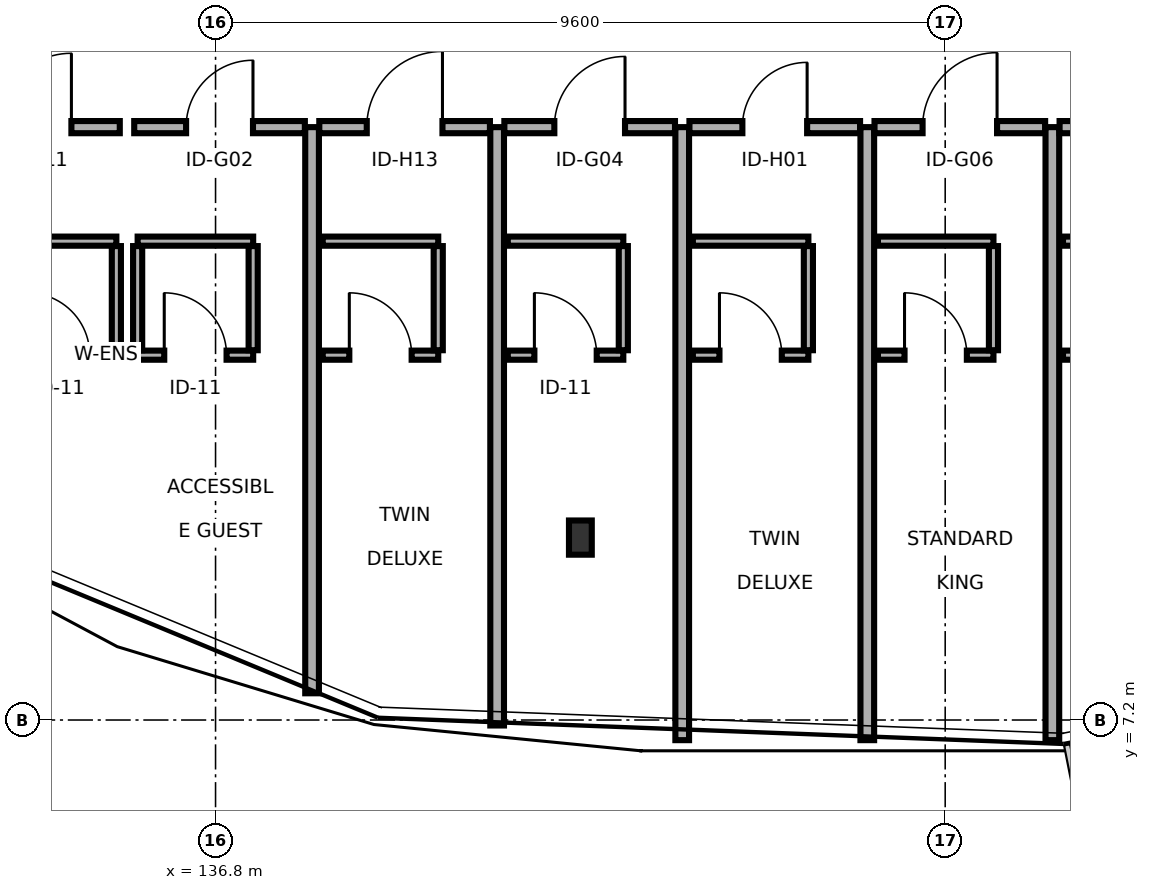
"""IFC4 building model, lengths in metres.
Left out: names, types, materials, properties, quantities, classifications, styles, units other than length and angle.
Written with IfcOpenShell. Run it as: python <this file> out.ifc"""

import sys

from ifc_helpers import new_model, si_unit, direction, frame, frame_2d, origin, origin_2d, place, context, subcontext, project, spatial, rectangle, i_section, extrude, element, fill, save


model = new_model("IFC4")
c1 = context("Model", 3, precision=1e-05, world=origin(), true_north=direction((0.0, 1.0)))
c2 = subcontext(c1, "Body", "Model", "MODEL_VIEW")
j1 = project(units=[si_unit("LENGTHUNIT", "METRE"), si_unit("PLANEANGLEUNIT", "RADIAN")], contexts=[c1])
p1 = place(None, origin())
s1 = spatial("IfcSite", under=j1, at=p1, CompositionType="ELEMENT")
p2 = place(p1, origin())
s2 = spatial("IfcBuilding", under=s1, at=p2, CompositionType="ELEMENT")
p3 = place(p2, frame((0.0, 0.0, 31.7)))
s3 = spatial("IfcBuildingStorey", under=s2, at=p3, CompositionType="ELEMENT", Elevation=31.7)
p4 = place(p3, frame((141.6, 9.6, 0.0), z_axis=(0.0, 0.0, 1.0), x_axis=(1.0, 0.0, 0.0)))
e1 = element("IfcColumn", 1, at=p4, inside=s3, PredefinedType="COLUMN", context=c2, shape_type="SweptSolid", body=[
    extrude(i_section(OverallWidth=0.3, OverallDepth=0.45, WebThickness=0.014, FlangeThickness=0.026, FilletRadius=0.027, at=origin_2d()), origin(), (0.0, 0.0, 1.0), 3.4),
])
p5 = place(p3, frame((133.295, 15.0, 0.0), z_axis=(0.0, 0.0, 1.0), x_axis=(1.0, 0.0, 0.0)))
e2 = element("IfcWall", 2, at=p5, inside=s3, PredefinedType="PARTITIONING", context=c2, shape_type="SweptSolid", body=[
    extrude(rectangle(XDim=2.245, YDim=0.16, at=frame_2d((1.123, 0.0))), origin(), (0.0, 0.0, 1.0), 3.17),
])
p6 = place(p5, frame((0.636, 0.0, 0.0)))
e3 = element("IfcOpeningElement", 3, at=p6, cuts=e2, PredefinedType="OPENING", context=c2, shape_type="SweptSolid", body=[
    extrude(rectangle(XDim=0.972, YDim=2.16, at=frame_2d((0.486, 1.08))), frame((0.0, 0.09, 0.0), z_axis=(0.0, -1.0, 0.0), x_axis=(1.0, 0.0, 0.0)), (0.0, 0.0, 1.0), 0.18),
])
p7 = place(p3, frame((133.975, 12.0, 0.0), z_axis=(0.0, 0.0, 1.0), x_axis=(1.0, 0.0, 0.0)))
e4 = element("IfcWall", 4, at=p7, inside=s3, PredefinedType="PARTITIONING", context=c2, shape_type="SweptSolid", body=[
    extrude(rectangle(XDim=1.52, YDim=0.12, at=frame_2d((0.76, 0.0))), origin(), (0.0, 0.0, 1.0), 2.755),
])
p8 = place(p7, frame((0.35, 0.0, 0.0)))
e5 = element("IfcOpeningElement", 5, at=p8, cuts=e4, PredefinedType="OPENING", context=c2, shape_type="SweptSolid", body=[
    extrude(rectangle(XDim=0.82, YDim=2.08, at=frame_2d((0.41, 1.04))), frame((0.0, 0.07, 0.0), z_axis=(0.0, -1.0, 0.0), x_axis=(1.0, 0.0, 0.0)), (0.0, 0.0, 1.0), 0.14),
])
p9 = place(p3, frame((133.975, 13.5, 0.0), z_axis=(0.0, 0.0, 1.0), x_axis=(1.0, 0.0, 0.0)))
e6 = element("IfcWall", 6, at=p9, inside=s3, PredefinedType="PARTITIONING", context=c2, shape_type="SweptSolid", body=[
    extrude(rectangle(XDim=1.52, YDim=0.12, at=frame_2d((0.76, 0.0))), origin(), (0.0, 0.0, 1.0), 3.17),
])
p10 = place(p3, frame((135.495, 12.065, 0.0), z_axis=(0.0, 0.0, 1.0), x_axis=(0.0, 1.0, 0.0)))
e7 = element("IfcWall", 7, at=p10, inside=s3, PredefinedType="PARTITIONING", context=c2, shape_type="SweptSolid", body=[
    extrude(rectangle(XDim=1.37, YDim=0.12, at=frame_2d((0.685, 0.0))), origin(), (0.0, 0.0, 1.0), 2.755),
])
p11 = place(p3, frame((135.73, 15.0, 0.0), z_axis=(0.0, 0.0, 1.0), x_axis=(1.0, 0.0, 0.0)))
e8 = element("IfcWall", 8, at=p11, inside=s3, PredefinedType="PARTITIONING", context=c2, shape_type="SweptSolid", body=[
    extrude(rectangle(XDim=2.245, YDim=0.16, at=frame_2d((1.123, 0.0))), origin(), (0.0, 0.0, 1.0), 2.755),
])
p12 = place(p11, frame((0.683, 0.0, 0.0)))
e9 = element("IfcOpeningElement", 9, at=p12, cuts=e8, PredefinedType="OPENING", context=c2, shape_type="SweptSolid", body=[
    extrude(rectangle(XDim=0.88, YDim=2.05, at=frame_2d((0.44, 1.025))), frame((0.0, 0.09, 0.0), z_axis=(0.0, -1.0, 0.0), x_axis=(1.0, 0.0, 0.0)), (0.0, 0.0, 1.0), 0.18),
])
p13 = place(p3, frame((135.775, 12.0, 0.0), z_axis=(0.0, 0.0, 1.0), x_axis=(1.0, 0.0, 0.0)))
e10 = element("IfcWall", 10, at=p13, inside=s3, PredefinedType="PARTITIONING", context=c2, shape_type="SweptSolid", body=[
    extrude(rectangle(XDim=1.52, YDim=0.12, at=frame_2d((0.76, 0.0))), origin(), (0.0, 0.0, 1.0), 3.17),
])
p14 = place(p13, frame((0.35, 0.0, 0.0)))
e11 = element("IfcOpeningElement", 11, at=p14, cuts=e10, PredefinedType="OPENING", context=c2, shape_type="SweptSolid", body=[
    extrude(rectangle(XDim=0.82, YDim=2.08, at=frame_2d((0.41, 1.04))), frame((0.0, 0.07, 0.0), z_axis=(0.0, -1.0, 0.0), x_axis=(1.0, 0.0, 0.0)), (0.0, 0.0, 1.0), 0.14),
])
p15 = place(p3, frame((135.775, 13.5, 0.0), z_axis=(0.0, 0.0, 1.0), x_axis=(1.0, 0.0, 0.0)))
e12 = element("IfcWall", 12, at=p15, inside=s3, PredefinedType="PARTITIONING", context=c2, shape_type="SweptSolid", body=[
    extrude(rectangle(XDim=1.52, YDim=0.12, at=frame_2d((0.76, 0.0))), origin(), (0.0, 0.0, 1.0), 2.755),
])
p16 = place(p3, frame((135.775, 12.065, 0.0), z_axis=(0.0, 0.0, 1.0), x_axis=(0.0, 1.0, 0.0)))
e13 = element("IfcWall", 13, at=p16, inside=s3, PredefinedType="PARTITIONING", context=c2, shape_type="SweptSolid", body=[
    extrude(rectangle(XDim=1.37, YDim=0.12, at=frame_2d((0.685, 0.0))), origin(), (0.0, 0.0, 1.0), 2.755),
])
p17 = place(p3, frame((137.295, 12.065, 0.0), z_axis=(0.0, 0.0, 1.0), x_axis=(0.0, 1.0, 0.0)))
e14 = element("IfcWall", 14, at=p17, inside=s3, PredefinedType="PARTITIONING", context=c2, shape_type="SweptSolid", body=[
    extrude(rectangle(XDim=1.37, YDim=0.12, at=frame_2d((0.685, 0.0))), origin(), (0.0, 0.0, 1.0), 3.17),
])
p18 = place(p3, frame((138.07, 7.552, 0.0), z_axis=(0.0, 0.0, 1.0), x_axis=(0.0, 1.0, 0.0)))
e15 = element("IfcWall", 15, at=p18, inside=s3, PredefinedType="PARTITIONING", context=c2, shape_type="SweptSolid", body=[
    extrude(rectangle(XDim=7.448, YDim=0.18, at=frame_2d((3.724, 0.0))), origin(), (0.0, 0.0, 1.0), 2.655),
])
p19 = place(p3, frame((138.165, 15.0, 0.0), z_axis=(0.0, 0.0, 1.0), x_axis=(1.0, 0.0, 0.0)))
e16 = element("IfcWall", 16, at=p19, inside=s3, PredefinedType="PARTITIONING", context=c2, shape_type="SweptSolid", body=[
    extrude(rectangle(XDim=2.245, YDim=0.16, at=frame_2d((1.123, 0.0))), origin(), (0.0, 0.0, 1.0), 3.17),
])
p20 = place(p19, frame((0.625, 0.0, 0.0)))
e17 = element("IfcOpeningElement", 17, at=p20, cuts=e16, PredefinedType="OPENING", context=c2, shape_type="SweptSolid", body=[
    extrude(rectangle(XDim=0.996, YDim=2.1, at=frame_2d((0.498, 1.05))), frame((0.0, 0.09, 0.0), z_axis=(0.0, -1.0, 0.0), x_axis=(1.0, 0.0, 0.0)), (0.0, 0.0, 1.0), 0.18),
])
p21 = place(p3, frame((138.21, 12.0, 0.0), z_axis=(0.0, 0.0, 1.0), x_axis=(1.0, 0.0, 0.0)))
e18 = element("IfcWall", 18, at=p21, inside=s3, PredefinedType="PARTITIONING", context=c2, shape_type="SweptSolid", body=[
    extrude(rectangle(XDim=1.52, YDim=0.12, at=frame_2d((0.76, 0.0))), origin(), (0.0, 0.0, 1.0), 3.17),
])
p22 = place(p21, frame((0.35, 0.0, 0.0)))
e19 = element("IfcOpeningElement", 19, at=p22, cuts=e18, PredefinedType="OPENING", context=c2, shape_type="SweptSolid", body=[
    extrude(rectangle(XDim=0.82, YDim=2.08, at=frame_2d((0.41, 1.04))), frame((0.0, 0.07, 0.0), z_axis=(0.0, -1.0, 0.0), x_axis=(1.0, 0.0, 0.0)), (0.0, 0.0, 1.0), 0.14),
])
p23 = place(p3, frame((138.21, 13.5, 0.0), z_axis=(0.0, 0.0, 1.0), x_axis=(1.0, 0.0, 0.0)))
e20 = element("IfcWall", 20, at=p23, inside=s3, PredefinedType="PARTITIONING", context=c2, shape_type="SweptSolid", body=[
    extrude(rectangle(XDim=1.52, YDim=0.12, at=frame_2d((0.76, 0.0))), origin(), (0.0, 0.0, 1.0), 3.17),
])
p24 = place(p3, frame((139.73, 12.065, 0.0), z_axis=(0.0, 0.0, 1.0), x_axis=(0.0, 1.0, 0.0)))
e21 = element("IfcWall", 21, at=p24, inside=s3, PredefinedType="PARTITIONING", context=c2, shape_type="SweptSolid", body=[
    extrude(rectangle(XDim=1.37, YDim=0.12, at=frame_2d((0.685, 0.0))), origin(), (0.0, 0.0, 1.0), 3.17),
])
p25 = place(p3, frame((140.505, 7.128, 0.0), z_axis=(0.0, 0.0, 1.0), x_axis=(0.0, 1.0, 0.0)))
e22 = element("IfcWall", 22, at=p25, inside=s3, PredefinedType="PARTITIONING", context=c2, shape_type="SweptSolid", body=[
    extrude(rectangle(XDim=7.872, YDim=0.18, at=frame_2d((3.936, 0.0))), origin(), (0.0, 0.0, 1.0), 2.655),
])
p26 = place(p3, frame((140.6, 15.0, 0.0), z_axis=(0.0, 0.0, 1.0), x_axis=(1.0, 0.0, 0.0)))
e23 = element("IfcWall", 23, at=p26, inside=s3, PredefinedType="PARTITIONING", context=c2, shape_type="SweptSolid", body=[
    extrude(rectangle(XDim=2.245, YDim=0.16, at=frame_2d((1.123, 0.0))), origin(), (0.0, 0.0, 1.0), 2.755),
])
p27 = place(p26, frame((0.657, 0.0, 0.0)))
e24 = element("IfcOpeningElement", 24, at=p27, cuts=e23, PredefinedType="OPENING", context=c2, shape_type="SweptSolid", body=[
    extrude(rectangle(XDim=0.93, YDim=2.05, at=frame_2d((0.465, 1.025))), frame((0.0, 0.09, 0.0), z_axis=(0.0, -1.0, 0.0), x_axis=(1.0, 0.0, 0.0)), (0.0, 0.0, 1.0), 0.18),
])
p28 = place(p3, frame((140.645, 12.0, 0.0), z_axis=(0.0, 0.0, 1.0), x_axis=(1.0, 0.0, 0.0)))
e25 = element("IfcWall", 25, at=p28, inside=s3, PredefinedType="PARTITIONING", context=c2, shape_type="SweptSolid", body=[
    extrude(rectangle(XDim=1.52, YDim=0.12, at=frame_2d((0.76, 0.0))), origin(), (0.0, 0.0, 1.0), 2.755),
])
p29 = place(p28, frame((0.35, 0.0, 0.0)))
e26 = element("IfcOpeningElement", 26, at=p29, cuts=e25, PredefinedType="OPENING", context=c2, shape_type="SweptSolid", body=[
    extrude(rectangle(XDim=0.82, YDim=2.08, at=frame_2d((0.41, 1.04))), frame((0.0, 0.07, 0.0), z_axis=(0.0, -1.0, 0.0), x_axis=(1.0, 0.0, 0.0)), (0.0, 0.0, 1.0), 0.14),
])
p30 = place(p3, frame((140.645, 13.5, 0.0), z_axis=(0.0, 0.0, 1.0), x_axis=(1.0, 0.0, 0.0)))
e27 = element("IfcWall", 27, at=p30, inside=s3, PredefinedType="PARTITIONING", context=c2, shape_type="SweptSolid", body=[
    extrude(rectangle(XDim=1.52, YDim=0.12, at=frame_2d((0.76, 0.0))), origin(), (0.0, 0.0, 1.0), 2.755),
])
p31 = place(p3, frame((142.165, 12.065, 0.0), z_axis=(0.0, 0.0, 1.0), x_axis=(0.0, 1.0, 0.0)))
e28 = element("IfcWall", 28, at=p31, inside=s3, PredefinedType="PARTITIONING", context=c2, shape_type="SweptSolid", body=[
    extrude(rectangle(XDim=1.37, YDim=0.12, at=frame_2d((0.685, 0.0))), origin(), (0.0, 0.0, 1.0), 3.17),
])
p32 = place(p3, frame((142.94, 6.935, 0.0), z_axis=(0.0, 0.0, 1.0), x_axis=(0.0, 1.0, 0.0)))
e29 = element("IfcWall", 29, at=p32, inside=s3, PredefinedType="PARTITIONING", context=c2, shape_type="SweptSolid", body=[
    extrude(rectangle(XDim=8.065, YDim=0.18, at=frame_2d((4.032, 0.0))), origin(), (0.0, 0.0, 1.0), 2.655),
])
p33 = place(p3, frame((143.035, 15.0, 0.0), z_axis=(0.0, 0.0, 1.0), x_axis=(1.0, 0.0, 0.0)))
e30 = element("IfcWall", 30, at=p33, inside=s3, PredefinedType="PARTITIONING", context=c2, shape_type="SweptSolid", body=[
    extrude(rectangle(XDim=2.245, YDim=0.16, at=frame_2d((1.123, 0.0))), origin(), (0.0, 0.0, 1.0), 3.17),
])
p34 = place(p33, frame((0.697, 0.0, 0.0)))
e31 = element("IfcOpeningElement", 31, at=p34, cuts=e30, PredefinedType="OPENING", context=c2, shape_type="SweptSolid", body=[
    extrude(rectangle(XDim=0.852, YDim=2.1, at=frame_2d((0.426, 1.05))), frame((0.0, 0.09, 0.0), z_axis=(0.0, -1.0, 0.0), x_axis=(1.0, 0.0, 0.0)), (0.0, 0.0, 1.0), 0.18),
])
p35 = place(p3, frame((143.08, 12.0, 0.0), z_axis=(0.0, 0.0, 1.0), x_axis=(1.0, 0.0, 0.0)))
e32 = element("IfcWall", 32, at=p35, inside=s3, PredefinedType="PARTITIONING", context=c2, shape_type="SweptSolid", body=[
    extrude(rectangle(XDim=1.52, YDim=0.12, at=frame_2d((0.76, 0.0))), origin(), (0.0, 0.0, 1.0), 3.17),
])
p36 = place(p35, frame((0.35, 0.0, 0.0)))
e33 = element("IfcOpeningElement", 33, at=p36, cuts=e32, PredefinedType="OPENING", context=c2, shape_type="SweptSolid", body=[
    extrude(rectangle(XDim=0.82, YDim=2.08, at=frame_2d((0.41, 1.04))), frame((0.0, 0.07, 0.0), z_axis=(0.0, -1.0, 0.0), x_axis=(1.0, 0.0, 0.0)), (0.0, 0.0, 1.0), 0.14),
])
p37 = place(p3, frame((143.08, 13.5, 0.0), z_axis=(0.0, 0.0, 1.0), x_axis=(1.0, 0.0, 0.0)))
e34 = element("IfcWall", 34, at=p37, inside=s3, PredefinedType="PARTITIONING", context=c2, shape_type="SweptSolid", body=[
    extrude(rectangle(XDim=1.52, YDim=0.12, at=frame_2d((0.76, 0.0))), origin(), (0.0, 0.0, 1.0), 3.17),
])
p38 = place(p3, frame((144.6, 12.065, 0.0), z_axis=(0.0, 0.0, 1.0), x_axis=(0.0, 1.0, 0.0)))
e35 = element("IfcWall", 35, at=p38, inside=s3, PredefinedType="PARTITIONING", context=c2, shape_type="SweptSolid", body=[
    extrude(rectangle(XDim=1.37, YDim=0.12, at=frame_2d((0.685, 0.0))), origin(), (0.0, 0.0, 1.0), 3.17),
])
p39 = place(p3, frame((145.375, 6.935, 0.0), z_axis=(0.0, 0.0, 1.0), x_axis=(0.0, 1.0, 0.0)))
e36 = element("IfcWall", 36, at=p39, inside=s3, PredefinedType="PARTITIONING", context=c2, shape_type="SweptSolid", body=[
    extrude(rectangle(XDim=8.065, YDim=0.18, at=frame_2d((4.032, 0.0))), origin(), (0.0, 0.0, 1.0), 2.655),
])
p40 = place(p3, frame((145.47, 15.0, 0.0), z_axis=(0.0, 0.0, 1.0), x_axis=(1.0, 0.0, 0.0)))
e37 = element("IfcWall", 37, at=p40, inside=s3, PredefinedType="PARTITIONING", context=c2, shape_type="SweptSolid", body=[
    extrude(rectangle(XDim=2.245, YDim=0.16, at=frame_2d((1.123, 0.0))), origin(), (0.0, 0.0, 1.0), 3.17),
])
p41 = place(p40, frame((0.633, 0.0, 0.0)))
e38 = element("IfcOpeningElement", 38, at=p41, cuts=e37, PredefinedType="OPENING", context=c2, shape_type="SweptSolid", body=[
    extrude(rectangle(XDim=0.98, YDim=2.05, at=frame_2d((0.49, 1.025))), frame((0.0, 0.09, 0.0), z_axis=(0.0, -1.0, 0.0), x_axis=(1.0, 0.0, 0.0)), (0.0, 0.0, 1.0), 0.18),
])
p42 = place(p3, frame((145.515, 12.0, 0.0), z_axis=(0.0, 0.0, 1.0), x_axis=(1.0, 0.0, 0.0)))
e39 = element("IfcWall", 39, at=p42, inside=s3, PredefinedType="PARTITIONING", context=c2, shape_type="SweptSolid", body=[
    extrude(rectangle(XDim=1.52, YDim=0.12, at=frame_2d((0.76, 0.0))), origin(), (0.0, 0.0, 1.0), 3.17),
])
p43 = place(p42, frame((0.35, 0.0, 0.0)))
e40 = element("IfcOpeningElement", 40, at=p43, cuts=e39, PredefinedType="OPENING", context=c2, shape_type="SweptSolid", body=[
    extrude(rectangle(XDim=0.82, YDim=2.08, at=frame_2d((0.41, 1.04))), frame((0.0, 0.07, 0.0), z_axis=(0.0, -1.0, 0.0), x_axis=(1.0, 0.0, 0.0)), (0.0, 0.0, 1.0), 0.14),
])
p44 = place(p3, frame((145.515, 13.5, 0.0), z_axis=(0.0, 0.0, 1.0), x_axis=(1.0, 0.0, 0.0)))
e41 = element("IfcWall", 41, at=p44, inside=s3, PredefinedType="PARTITIONING", context=c2, shape_type="SweptSolid", body=[
    extrude(rectangle(XDim=1.52, YDim=0.12, at=frame_2d((0.76, 0.0))), origin(), (0.0, 0.0, 1.0), 3.17),
])
p45 = place(p3, frame((147.035, 12.065, 0.0), z_axis=(0.0, 0.0, 1.0), x_axis=(0.0, 1.0, 0.0)))
e42 = element("IfcWall", 42, at=p45, inside=s3, PredefinedType="PARTITIONING", context=c2, shape_type="SweptSolid", body=[
    extrude(rectangle(XDim=1.37, YDim=0.12, at=frame_2d((0.685, 0.0))), origin(), (0.0, 0.0, 1.0), 3.17),
])
p46 = place(p3, frame((147.81, 6.935, 0.0), z_axis=(0.0, 0.0, 1.0), x_axis=(0.0, 1.0, 0.0)))
e43 = element("IfcWall", 43, at=p46, inside=s3, PredefinedType="PARTITIONING", context=c2, shape_type="SweptSolid", body=[
    extrude(rectangle(XDim=8.065, YDim=0.18, at=frame_2d((4.032, 0.0))), origin(), (0.0, 0.0, 1.0), 2.655),
])
p47 = place(p3, frame((147.905, 15.0, 0.0), z_axis=(0.0, 0.0, 1.0), x_axis=(1.0, 0.0, 0.0)))
e44 = element("IfcWall", 44, at=p47, inside=s3, PredefinedType="PARTITIONING", context=c2, shape_type="SweptSolid", body=[
    extrude(rectangle(XDim=2.245, YDim=0.16, at=frame_2d((1.123, 0.0))), origin(), (0.0, 0.0, 1.0), 2.755),
])
p48 = place(p47, frame((0.685, 0.0, 0.0)))
e45 = element("IfcOpeningElement", 45, at=p48, cuts=e44, PredefinedType="OPENING", context=c2, shape_type="SweptSolid", body=[
    extrude(rectangle(XDim=0.876, YDim=2.16, at=frame_2d((0.438, 1.08))), frame((0.0, 0.09, 0.0), z_axis=(0.0, -1.0, 0.0), x_axis=(1.0, 0.0, 0.0)), (0.0, 0.0, 1.0), 0.18),
])
p49 = place(p3, frame((147.95, 12.0, 0.0), z_axis=(0.0, 0.0, 1.0), x_axis=(1.0, 0.0, 0.0)))
e46 = element("IfcWall", 46, at=p49, inside=s3, PredefinedType="PARTITIONING", context=c2, shape_type="SweptSolid", body=[
    extrude(rectangle(XDim=1.52, YDim=0.12, at=frame_2d((0.76, 0.0))), origin(), (0.0, 0.0, 1.0), 2.755),
])
p50 = place(p49, frame((0.35, 0.0, 0.0)))
e47 = element("IfcOpeningElement", 47, at=p50, cuts=e46, PredefinedType="OPENING", context=c2, shape_type="SweptSolid", body=[
    extrude(rectangle(XDim=0.82, YDim=2.08, at=frame_2d((0.41, 1.04))), frame((0.0, 0.07, 0.0), z_axis=(0.0, -1.0, 0.0), x_axis=(1.0, 0.0, 0.0)), (0.0, 0.0, 1.0), 0.14),
])
p51 = place(p3, frame((147.95, 13.5, 0.0), z_axis=(0.0, 0.0, 1.0), x_axis=(1.0, 0.0, 0.0)))
e48 = element("IfcWall", 48, at=p51, inside=s3, PredefinedType="PARTITIONING", context=c2, shape_type="SweptSolid", body=[
    extrude(rectangle(XDim=1.52, YDim=0.12, at=frame_2d((0.76, 0.0))), origin(), (0.0, 0.0, 1.0), 2.755),
])
p52 = place(p6, origin())
e49 = element("IfcDoor", 49, at=p52, inside=s3, OperationType="SINGLE_SWING_RIGHT", PredefinedType="DOOR", context=c2, shape_type="SweptSolid", body=[
    extrude(rectangle(XDim=0.972, YDim=2.16, at=frame_2d((0.486, 1.08))), frame((0.0, 0.025, 0.0), z_axis=(0.0, -1.0, 0.0), x_axis=(1.0, 0.0, 0.0)), (0.0, 0.0, 1.0), 0.05),
])
fill(e3, e49)
p53 = place(p8, origin())
e50 = element("IfcDoor", 50, at=p53, inside=s3, OperationType="SINGLE_SWING_LEFT", PredefinedType="DOOR", context=c2, shape_type="SweptSolid", body=[
    extrude(rectangle(XDim=0.82, YDim=2.08, at=frame_2d((0.41, 1.04))), frame((0.0, 0.025, 0.0), z_axis=(0.0, -1.0, 0.0), x_axis=(1.0, 0.0, 0.0)), (0.0, 0.0, 1.0), 0.05),
])
fill(e5, e50)
p54 = place(p12, origin())
e51 = element("IfcDoor", 51, at=p54, inside=s3, OperationType="SINGLE_SWING_RIGHT", PredefinedType="DOOR", context=c2, shape_type="SweptSolid", body=[
    extrude(rectangle(XDim=0.88, YDim=2.05, at=frame_2d((0.44, 1.025))), frame((0.0, 0.025, 0.0), z_axis=(0.0, -1.0, 0.0), x_axis=(1.0, 0.0, 0.0)), (0.0, 0.0, 1.0), 0.05),
])
fill(e9, e51)
p55 = place(p14, origin())
e52 = element("IfcDoor", 52, at=p55, inside=s3, OperationType="SINGLE_SWING_LEFT", PredefinedType="DOOR", context=c2, shape_type="SweptSolid", body=[
    extrude(rectangle(XDim=0.82, YDim=2.08, at=frame_2d((0.41, 1.04))), frame((0.0, 0.025, 0.0), z_axis=(0.0, -1.0, 0.0), x_axis=(1.0, 0.0, 0.0)), (0.0, 0.0, 1.0), 0.05),
])
fill(e11, e52)
p56 = place(p20, origin())
e53 = element("IfcDoor", 53, at=p56, inside=s3, OperationType="SINGLE_SWING_RIGHT", PredefinedType="DOOR", context=c2, shape_type="SweptSolid", body=[
    extrude(rectangle(XDim=0.996, YDim=2.1, at=frame_2d((0.498, 1.05))), frame((0.0, 0.025, 0.0), z_axis=(0.0, -1.0, 0.0), x_axis=(1.0, 0.0, 0.0)), (0.0, 0.0, 1.0), 0.05),
])
fill(e17, e53)
p57 = place(p22, origin())
e54 = element("IfcDoor", 54, at=p57, inside=s3, OperationType="SINGLE_SWING_LEFT", PredefinedType="DOOR", context=c2, shape_type="SweptSolid", body=[
    extrude(rectangle(XDim=0.82, YDim=2.08, at=frame_2d((0.41, 1.04))), frame((0.0, 0.025, 0.0), z_axis=(0.0, -1.0, 0.0), x_axis=(1.0, 0.0, 0.0)), (0.0, 0.0, 1.0), 0.05),
])
fill(e19, e54)
p58 = place(p27, origin())
e55 = element("IfcDoor", 55, at=p58, inside=s3, OperationType="SINGLE_SWING_RIGHT", PredefinedType="DOOR", context=c2, shape_type="SweptSolid", body=[
    extrude(rectangle(XDim=0.93, YDim=2.05, at=frame_2d((0.465, 1.025))), frame((0.0, 0.025, 0.0), z_axis=(0.0, -1.0, 0.0), x_axis=(1.0, 0.0, 0.0)), (0.0, 0.0, 1.0), 0.05),
])
fill(e24, e55)
p59 = place(p29, origin())
e56 = element("IfcDoor", 56, at=p59, inside=s3, OperationType="SINGLE_SWING_LEFT", PredefinedType="DOOR", context=c2, shape_type="SweptSolid", body=[
    extrude(rectangle(XDim=0.82, YDim=2.08, at=frame_2d((0.41, 1.04))), frame((0.0, 0.025, 0.0), z_axis=(0.0, -1.0, 0.0), x_axis=(1.0, 0.0, 0.0)), (0.0, 0.0, 1.0), 0.05),
])
fill(e26, e56)
p60 = place(p34, origin())
e57 = element("IfcDoor", 57, at=p60, inside=s3, OperationType="SINGLE_SWING_RIGHT", PredefinedType="DOOR", context=c2, shape_type="SweptSolid", body=[
    extrude(rectangle(XDim=0.852, YDim=2.1, at=frame_2d((0.426, 1.05))), frame((0.0, 0.025, 0.0), z_axis=(0.0, -1.0, 0.0), x_axis=(1.0, 0.0, 0.0)), (0.0, 0.0, 1.0), 0.05),
])
fill(e31, e57)
p61 = place(p36, origin())
e58 = element("IfcDoor", 58, at=p61, inside=s3, OperationType="SINGLE_SWING_LEFT", PredefinedType="DOOR", context=c2, shape_type="SweptSolid", body=[
    extrude(rectangle(XDim=0.82, YDim=2.08, at=frame_2d((0.41, 1.04))), frame((0.0, 0.025, 0.0), z_axis=(0.0, -1.0, 0.0), x_axis=(1.0, 0.0, 0.0)), (0.0, 0.0, 1.0), 0.05),
])
fill(e33, e58)
p62 = place(p41, origin())
e59 = element("IfcDoor", 59, at=p62, inside=s3, OperationType="SINGLE_SWING_RIGHT", PredefinedType="DOOR", context=c2, shape_type="SweptSolid", body=[
    extrude(rectangle(XDim=0.98, YDim=2.05, at=frame_2d((0.49, 1.025))), frame((0.0, 0.025, 0.0), z_axis=(0.0, -1.0, 0.0), x_axis=(1.0, 0.0, 0.0)), (0.0, 0.0, 1.0), 0.05),
])
fill(e38, e59)
p63 = place(p43, origin())
e60 = element("IfcDoor", 60, at=p63, inside=s3, OperationType="SINGLE_SWING_LEFT", PredefinedType="DOOR", context=c2, shape_type="SweptSolid", body=[
    extrude(rectangle(XDim=0.82, YDim=2.08, at=frame_2d((0.41, 1.04))), frame((0.0, 0.025, 0.0), z_axis=(0.0, -1.0, 0.0), x_axis=(1.0, 0.0, 0.0)), (0.0, 0.0, 1.0), 0.05),
])
fill(e40, e60)
save(model, sys.argv[1])
